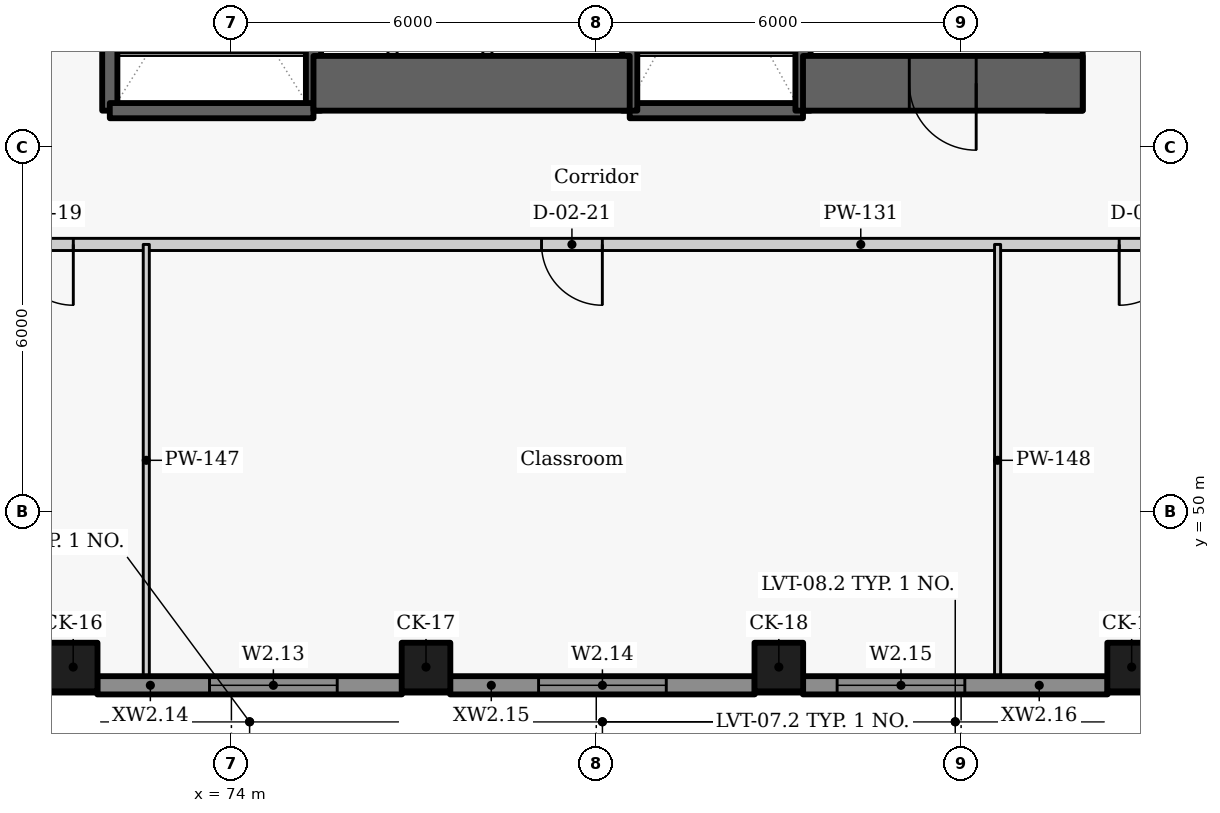
"""IFC4 building model, lengths in metres.
Left out: names, types, materials, properties, quantities, classifications, styles, units other than length and angle.
Written with IfcOpenShell. Run it as: python <this file> out.ifc"""

import sys

from ifc_helpers import new_model, si_unit, direction, frame, frame_2d, origin, origin_2d, place, context, subcontext, project, spatial, rectangle, extrude, element, fill, save


model = new_model("IFC4")
c1 = context("Model", 3, precision=1e-05, world=origin(), true_north=direction((0.0, 1.0)))
c2 = subcontext(c1, "Body", "Model", "MODEL_VIEW")
j1 = project(units=[si_unit("LENGTHUNIT", "METRE"), si_unit("PLANEANGLEUNIT", "RADIAN")], contexts=[c1])
p1 = place(None, origin())
s1 = spatial("IfcSite", under=j1, at=p1, CompositionType="ELEMENT")
p2 = place(p1, origin())
s2 = spatial("IfcBuilding", under=s1, at=p2, CompositionType="ELEMENT")
p3 = place(p2, frame((0.0, 0.0, 24.0)))
s3 = spatial("IfcBuildingStorey", under=s2, at=p3, CompositionType="ELEMENT", Elevation=24.0)
for number, where, z_axis, x_axis in (
    (1, (71.398, 47.45, 0.0), (0.0, 0.0, 1.0), (1.0, 0.0, 0.0)),
    (2, (77.2, 47.45, 0.0), (0.0, 0.0, 1.0), (1.0, 0.0, 0.0)),
    (3, (83.002, 47.45, 0.0), (0.0, 0.0, 1.0), (1.0, 0.0, 0.0)),
    (4, (88.805, 47.45, 0.0), (0.0, 0.0, 1.0), (1.0, 0.0, 0.0)),
):
    element("IfcColumn", number, at=place(p3, frame(where, z_axis=z_axis, x_axis=x_axis)), inside=s3, PredefinedType="COLUMN", context=c2, shape_type="SweptSolid", body=[
        extrude(rectangle(XDim=0.8, YDim=0.8, at=origin_2d()), origin(), (0.0, 0.0, 1.0), 4.2),
    ])
p4 = place(p3, frame((71.794, 47.15, 0.0), z_axis=(0.0, 0.0, 1.0), x_axis=(1.0, 0.0, 0.0)))
e5 = element("IfcWall", 5, at=p4, inside=s3, PredefinedType="SOLIDWALL", context=c2, shape_type="SweptSolid", body=[
    extrude(rectangle(XDim=5.01, YDim=0.3, at=frame_2d((2.505, 0.0))), origin(), (0.0, 0.0, 1.0), 3.325),
])
p5 = place(p4, frame((1.846, 0.0, 0.9)))
e6 = element("IfcOpeningElement", 6, at=p5, cuts=e5, PredefinedType="OPENING", context=c2, shape_type="SweptSolid", body=[
    extrude(rectangle(XDim=2.1, YDim=2.05, at=frame_2d((1.05, 1.025))), frame((0.0, 0.16, 0.0), z_axis=(0.0, -1.0, 0.0), x_axis=(1.0, 0.0, 0.0)), (0.0, 0.0, 1.0), 0.32),
])
p6 = place(p3, frame((77.596, 47.15, 0.0), z_axis=(0.0, 0.0, 1.0), x_axis=(1.0, 0.0, 0.0)))
e7 = element("IfcWall", 7, at=p6, inside=s3, PredefinedType="SOLIDWALL", context=c2, shape_type="SweptSolid", body=[
    extrude(rectangle(XDim=5.01, YDim=0.3, at=frame_2d((2.505, 0.0))), origin(), (0.0, 0.0, 1.0), 3.325),
])
p7 = place(p6, frame((1.455, 0.0, 0.9)))
e8 = element("IfcOpeningElement", 8, at=p7, cuts=e7, PredefinedType="OPENING", context=c2, shape_type="SweptSolid", body=[
    extrude(rectangle(XDim=2.1, YDim=2.05, at=frame_2d((1.05, 1.025))), frame((0.0, 0.16, 0.0), z_axis=(0.0, -1.0, 0.0), x_axis=(1.0, 0.0, 0.0)), (0.0, 0.0, 1.0), 0.32),
])
p8 = place(p3, frame((83.398, 47.15, 0.0), z_axis=(0.0, 0.0, 1.0), x_axis=(1.0, 0.0, 0.0)))
e9 = element("IfcWall", 9, at=p8, inside=s3, PredefinedType="SOLIDWALL", context=c2, shape_type="SweptSolid", body=[
    extrude(rectangle(XDim=5.01, YDim=0.3, at=frame_2d((2.505, 0.0))), origin(), (0.0, 0.0, 1.0), 3.325),
])
p9 = place(p8, frame((0.563, 0.0, 0.9)))
e10 = element("IfcOpeningElement", 10, at=p9, cuts=e9, PredefinedType="OPENING", context=c2, shape_type="SweptSolid", body=[
    extrude(rectangle(XDim=2.1, YDim=2.05, at=frame_2d((1.05, 1.025))), frame((0.0, 0.16, 0.0), z_axis=(0.0, -1.0, 0.0), x_axis=(1.0, 0.0, 0.0)), (0.0, 0.0, 1.0), 0.32),
])
p10 = place(p3, frame((87.7, 72.2, -0.3), z_axis=(0.0, 0.0, 1.0), x_axis=(0.0, -1.0, 0.0)))
e11 = element("IfcWall", 11, at=p10, inside=s3, PredefinedType="SHEAR", context=c2, shape_type="SweptSolid", body=[
    extrude(rectangle(XDim=15.6, YDim=0.6, at=frame_2d((7.8, 0.0))), origin(), (0.0, 0.0, 1.0), 4.225),
])
p11 = place(p10, frame((11.8, 0.0, 0.3)))
e12 = element("IfcOpeningElement", 12, at=p11, cuts=e11, PredefinedType="OPENING", context=c2, shape_type="SweptSolid", body=[
    extrude(rectangle(XDim=1.1, YDim=2.1, at=frame_2d((0.55, 1.05))), frame((0.0, 0.31, 0.0), z_axis=(0.0, -1.0, 0.0), x_axis=(1.0, 0.0, 0.0)), (0.0, 0.0, 1.0), 0.62),
])
p12 = place(p3, frame((75.35, 56.6, -0.3), z_axis=(0.0, 0.0, 1.0), x_axis=(0.0, 1.0, 0.0)))
e13 = element("IfcWall", 13, at=p12, inside=s3, PredefinedType="SHEAR", context=c2, shape_type="SweptSolid", body=[
    extrude(rectangle(XDim=5.003, YDim=0.25, at=frame_2d((2.501, 0.0))), origin(), (0.0, 0.0, 1.0), 4.225),
])
p13 = place(p3, frame((72.0, 56.6, -0.3), z_axis=(0.0, 0.0, 1.0), x_axis=(0.0, 1.0, 0.0)))
e14 = element("IfcWall", 14, at=p13, inside=s3, PredefinedType="SHEAR", context=c2, shape_type="SweptSolid", body=[
    extrude(rectangle(XDim=6.5, YDim=0.25, at=frame_2d((3.25, 0.0))), origin(), (0.0, 0.0, 1.0), 4.225),
])
p14 = place(p3, frame((72.0, 56.6, -0.3), z_axis=(0.0, 0.0, 1.0), x_axis=(1.0, 0.0, 0.0)))
e15 = element("IfcWall", 15, at=p14, inside=s3, PredefinedType="SHEAR", context=c2, shape_type="SweptSolid", body=[
    extrude(rectangle(XDim=3.35, YDim=0.25, at=frame_2d((1.675, 0.0))), origin(), (0.0, 0.0, 1.0), 4.225),
])
p15 = place(p3, frame((80.55, 56.6, -0.3), z_axis=(0.0, 0.0, 1.0), x_axis=(1.0, 0.0, 0.0)))
e16 = element("IfcWall", 16, at=p15, inside=s3, PredefinedType="SHEAR", context=c2, shape_type="SweptSolid", body=[
    extrude(rectangle(XDim=2.85, YDim=0.25, at=frame_2d((1.425, 0.0))), origin(), (0.0, 0.0, 1.0), 4.225),
])
p16 = place(p3, frame((83.4, 63.1, -0.3), z_axis=(0.0, 0.0, 1.0), x_axis=(0.0, -1.0, 0.0)))
e17 = element("IfcWall", 17, at=p16, inside=s3, PredefinedType="SHEAR", context=c2, shape_type="SweptSolid", body=[
    extrude(rectangle(XDim=6.5, YDim=0.25, at=frame_2d((3.25, 0.0))), origin(), (0.0, 0.0, 1.0), 4.225),
])
p17 = place(p16, frame((0.25, 0.0, 0.3)))
e18 = element("IfcOpeningElement", 18, at=p17, cuts=e17, PredefinedType="OPENING", context=c2, shape_type="SweptSolid", body=[
    extrude(rectangle(XDim=0.9, YDim=2.1, at=frame_2d((0.45, 1.05))), frame((0.0, 0.135, 0.0), z_axis=(0.0, -1.0, 0.0), x_axis=(1.0, 0.0, 0.0)), (0.0, 0.0, 1.0), 0.27),
])
p18 = place(p3, frame((80.55, 56.6, -0.3), z_axis=(0.0, 0.0, 1.0), x_axis=(0.0, 1.0, 0.0)))
e19 = element("IfcWall", 19, at=p18, inside=s3, PredefinedType="SHEAR", context=c2, shape_type="SweptSolid", body=[
    extrude(rectangle(XDim=5.003, YDim=0.25, at=frame_2d((2.501, 0.0))), origin(), (0.0, 0.0, 1.0), 4.225),
])
p19 = place(p3, frame((75.35, 57.05, -0.3), z_axis=(0.0, 0.0, 1.0), x_axis=(1.0, 0.0, 0.0)))
e20 = element("IfcWall", 20, at=p19, inside=s3, PredefinedType="SHEAR", context=c2, shape_type="SweptSolid", body=[
    extrude(rectangle(XDim=5.2, YDim=0.9, at=frame_2d((2.6, 0.0))), origin(), (0.0, 0.0, 1.0), 4.225),
])
p20 = place(p3, frame((88.0, 57.05, -0.3), z_axis=(0.0, 0.0, 1.0), x_axis=(-1.0, 0.0, 0.0)))
e21 = element("IfcWall", 21, at=p20, inside=s3, PredefinedType="SHEAR", context=c2, shape_type="SweptSolid", body=[
    extrude(rectangle(XDim=4.6, YDim=0.9, at=frame_2d((2.3, 0.0))), origin(), (0.0, 0.0, 1.0), 4.225),
])
p21 = place(p20, frame((1.752, 0.0, 0.3)))
e22 = element("IfcOpeningElement", 22, at=p21, cuts=e21, PredefinedType="OPENING", context=c2, shape_type="SweptSolid", body=[
    extrude(rectangle(XDim=1.1, YDim=2.1, at=frame_2d((0.55, 1.05))), frame((0.0, 0.46, 0.0), z_axis=(0.0, -1.0, 0.0), x_axis=(1.0, 0.0, 0.0)), (0.0, 0.0, 1.0), 0.92),
])
for number, where, z_axis, x_axis in (
    (23, (76.65, 56.6, 0.0), (0.0, 0.0, 1.0), (0.0, 1.0, 0.0)),
    (24, (78.21, 56.6, 0.0), (0.0, 0.0, 1.0), (0.0, 1.0, 0.0)),
):
    element("IfcWall", number, at=place(p3, frame(where, z_axis=z_axis, x_axis=x_axis)), inside=s3, PredefinedType="PARTITIONING", context=c2, shape_type="SweptSolid", body=[
        extrude(rectangle(XDim=5.0, YDim=0.15, at=frame_2d((2.5, 0.0))), origin(), (0.0, 0.0, 1.0), 3.925),
    ])
p22 = place(p3, frame((90.2, 54.4, 0.0), z_axis=(0.0, 0.0, 1.0), x_axis=(-1.0, 0.0, 0.0)))
e25 = element("IfcWall", 25, at=p22, inside=s3, PredefinedType="PARTITIONING", context=c2, shape_type="SweptSolid", body=[
    extrude(rectangle(XDim=20.4, YDim=0.2, at=frame_2d((10.2, 0.0))), origin(), (0.0, 0.0, 1.0), 3.925),
])
p23 = place(p22, frame((18.8, 0.0, 0.0)))
e26 = element("IfcOpeningElement", 26, at=p23, cuts=e25, PredefinedType="OPENING", context=c2, shape_type="SweptSolid", body=[
    extrude(rectangle(XDim=1.0, YDim=2.1, at=frame_2d((0.5, 1.05))), frame((0.0, 0.11, 0.0), z_axis=(0.0, -1.0, 0.0), x_axis=(1.0, 0.0, 0.0)), (0.0, 0.0, 1.0), 0.22),
])
p24 = place(p22, frame((0.6, 0.0, 0.0)))
e27 = element("IfcOpeningElement", 27, at=p24, cuts=e25, PredefinedType="OPENING", context=c2, shape_type="SweptSolid", body=[
    extrude(rectangle(XDim=1.0, YDim=2.1, at=frame_2d((0.5, 1.05))), frame((0.0, 0.11, 0.0), z_axis=(0.0, -1.0, 0.0), x_axis=(1.0, 0.0, 0.0)), (0.0, 0.0, 1.0), 0.22),
])
p25 = place(p22, frame((10.1, 0.0, 0.0)))
e28 = element("IfcOpeningElement", 28, at=p25, cuts=e25, PredefinedType="OPENING", context=c2, shape_type="SweptSolid", body=[
    extrude(rectangle(XDim=1.0, YDim=2.1, at=frame_2d((0.5, 1.05))), frame((0.0, 0.11, 0.0), z_axis=(0.0, -1.0, 0.0), x_axis=(1.0, 0.0, 0.0)), (0.0, 0.0, 1.0), 0.22),
])
for number, where, z_axis, x_axis in (
    (29, (72.6, 47.3, 0.0), (0.0, 0.0, 1.0), (0.0, 1.0, 0.0)),
    (30, (86.6, 47.3, 0.0), (0.0, 0.0, 1.0), (0.0, 1.0, 0.0)),
):
    element("IfcWall", number, at=place(p3, frame(where, z_axis=z_axis, x_axis=x_axis)), inside=s3, PredefinedType="PARTITIONING", context=c2, shape_type="SweptSolid", body=[
        extrude(rectangle(XDim=7.1, YDim=0.1, at=frame_2d((3.55, 0.0))), origin(), (0.0, 0.0, 1.0), 3.925),
    ])
p26 = place(p5, origin())
e31 = element("IfcWindow", 31, at=p26, inside=s3, PartitioningType="SINGLE_PANEL", PredefinedType="WINDOW", context=c2, shape_type="SweptSolid", body=[
    extrude(rectangle(XDim=2.1, YDim=2.05, at=frame_2d((1.05, 1.025))), frame((0.0, 0.03, 0.0), z_axis=(0.0, -1.0, 0.0), x_axis=(1.0, 0.0, 0.0)), (0.0, 0.0, 1.0), 0.06),
])
fill(e6, e31)
p27 = place(p7, origin())
e32 = element("IfcWindow", 32, at=p27, inside=s3, PartitioningType="SINGLE_PANEL", PredefinedType="WINDOW", context=c2, shape_type="SweptSolid", body=[
    extrude(rectangle(XDim=2.1, YDim=2.05, at=frame_2d((1.05, 1.025))), frame((0.0, 0.03, 0.0), z_axis=(0.0, -1.0, 0.0), x_axis=(1.0, 0.0, 0.0)), (0.0, 0.0, 1.0), 0.06),
])
fill(e8, e32)
p28 = place(p9, origin())
e33 = element("IfcWindow", 33, at=p28, inside=s3, PartitioningType="SINGLE_PANEL", PredefinedType="WINDOW", context=c2, shape_type="SweptSolid", body=[
    extrude(rectangle(XDim=2.1, YDim=2.05, at=frame_2d((1.05, 1.025))), frame((0.0, 0.03, 0.0), z_axis=(0.0, -1.0, 0.0), x_axis=(1.0, 0.0, 0.0)), (0.0, 0.0, 1.0), 0.06),
])
fill(e10, e33)
p29 = place(p23, origin())
e34 = element("IfcDoor", 34, at=p29, inside=s3, OperationType="SINGLE_SWING_LEFT", PredefinedType="DOOR", context=c2, shape_type="SweptSolid", body=[
    extrude(rectangle(XDim=1.0, YDim=2.1, at=frame_2d((0.5, 1.05))), frame((0.0, 0.025, 0.0), z_axis=(0.0, -1.0, 0.0), x_axis=(1.0, 0.0, 0.0)), (0.0, 0.0, 1.0), 0.05),
])
fill(e26, e34)
p30 = place(p24, origin())
e35 = element("IfcDoor", 35, at=p30, inside=s3, OperationType="SINGLE_SWING_RIGHT", PredefinedType="DOOR", context=c2, shape_type="SweptSolid", body=[
    extrude(rectangle(XDim=1.0, YDim=2.1, at=frame_2d((0.5, 1.05))), frame((0.0, 0.025, 0.0), z_axis=(0.0, -1.0, 0.0), x_axis=(1.0, 0.0, 0.0)), (0.0, 0.0, 1.0), 0.05),
])
fill(e27, e35)
p31 = place(p25, origin())
e36 = element("IfcDoor", 36, at=p31, inside=s3, OperationType="SINGLE_SWING_LEFT", PredefinedType="DOOR", context=c2, shape_type="SweptSolid", body=[
    extrude(rectangle(XDim=1.0, YDim=2.1, at=frame_2d((0.5, 1.05))), frame((0.0, 0.025, 0.0), z_axis=(0.0, -1.0, 0.0), x_axis=(1.0, 0.0, 0.0)), (0.0, 0.0, 1.0), 0.05),
])
fill(e28, e36)
p32 = place(p21, origin())
e37 = element("IfcDoor", 37, at=p32, inside=s3, OperationType="SINGLE_SWING_LEFT", PredefinedType="DOOR", context=c2, shape_type="SweptSolid", body=[
    extrude(rectangle(XDim=1.1, YDim=2.1, at=frame_2d((0.55, 1.05))), frame((0.0, 0.025, 0.0), z_axis=(0.0, -1.0, 0.0), x_axis=(1.0, 0.0, 0.0)), (0.0, 0.0, 1.0), 0.05),
])
fill(e22, e37)
save(model, sys.argv[1])
